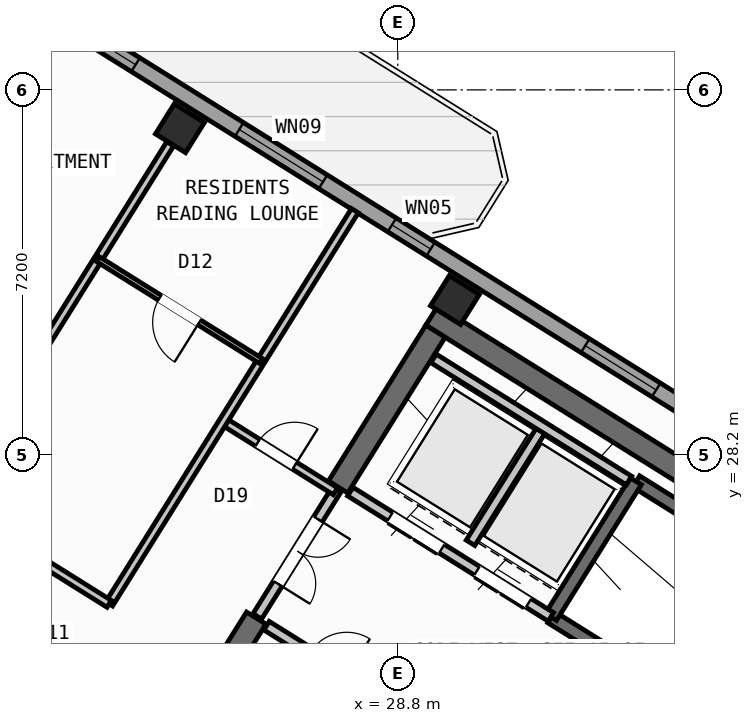
"""IFC4 building model, lengths in metres.
Left out: names, types, materials, properties, quantities, classifications, styles, units other than length and angle.
Written with IfcOpenShell. Run it as: python <this file> out.ifc"""

import sys

from ifc_helpers import new_model, si_unit, direction, frame, frame_2d, origin, origin_2d, place, context, subcontext, project, spatial, rectangle, hollow_rectangle, extrude, source, transform, mapped, element, fill, save


model = new_model("IFC4")
c1 = context("Model", 3, precision=1e-05, world=origin(), true_north=direction((0.0, 1.0)))
c2 = subcontext(c1, "Body", "Model", "MODEL_VIEW")
j1 = project(units=[si_unit("LENGTHUNIT", "METRE"), si_unit("PLANEANGLEUNIT", "RADIAN")], contexts=[c1])
p1 = place(None, origin())
s1 = spatial("IfcSite", under=j1, at=p1, CompositionType="ELEMENT")
p2 = place(p1, origin())
s2 = spatial("IfcBuilding", under=s1, at=p2, CompositionType="ELEMENT")
p3 = place(p2, frame((0.0, 0.0, 251.1)))
s3 = spatial("IfcBuildingStorey", under=s2, at=p3, CompositionType="ELEMENT", Elevation=251.1)
p4 = place(p3, frame((40.531, 24.036, 0.0), z_axis=(0.0, 0.0, 1.0), x_axis=(-0.848048787466, 0.529918157905, 0.0)))
e1 = element("IfcWall", 1, at=p4, inside=s3, PredefinedType="SHEAR", context=c2, shape_type="SweptSolid", body=[
    extrude(rectangle(XDim=13.04, YDim=0.45, at=frame_2d((6.52, 0.0))), origin(), (0.0, 0.0, 1.0), 3.32),
])
p5 = place(p3, frame((29.544, 30.636, 0.0), z_axis=(0.0, 0.0, 1.0), x_axis=(-0.529902075036, -0.848058836916, 0.0)))
e2 = element("IfcWall", 2, at=p5, inside=s3, PredefinedType="SHEAR", context=c2, shape_type="SweptSolid", body=[
    extrude(rectangle(XDim=3.625, YDim=0.45, at=frame_2d((1.812, 0.0))), origin(), (0.0, 0.0, 1.0), 3.32),
])
p6 = place(p3, frame((26.007, 24.976, 0.0), z_axis=(0.0, 0.0, 1.0), x_axis=(-0.529931155655, -0.848040665456, 0.0)))
e3 = element("IfcWall", 3, at=p6, inside=s3, PredefinedType="SHEAR", context=c2, shape_type="SweptSolid", body=[
    extrude(rectangle(XDim=6.475, YDim=0.45, at=frame_2d((3.238, 0.0))), origin(), (0.0, 0.0, 1.0), 3.32),
])
m1 = source(origin(), c2, "Body", "SweptSolid", [
    extrude(hollow_rectangle(XDim=0.7, YDim=0.7, WallThickness=0.028, at=origin_2d()), origin(), (0.0, 0.0, 1.0), 3.6),
])
for number, where, z_axis, x_axis in (
    (4, (29.928, 31.251, 0.0), (0.0, 0.0, 1.0), (-0.848, 0.53, 0.0)),
    (5, (24.5, 34.643, 0.0), (0.0, 0.0, 1.0), (-0.848, 0.53, 0.0)),
):
    element("IfcColumn", number, at=place(p3, frame(where, z_axis=z_axis, x_axis=x_axis)), inside=s3, PredefinedType="COLUMN", context=c2, shape_type="MappedRepresentation", body=[
        mapped(m1, transform((0.0, 0.0, 0.0), scale=1.0)),
    ])
p7 = place(p3, frame((14.138, 41.825, 0.0), z_axis=(0.0, 0.0, 1.0), x_axis=(0.848046498049, -0.529921821731, 0.0)))
e6 = element("IfcWall", 6, at=p7, inside=s3, PredefinedType="STANDARD", context=c2, shape_type="SweptSolid", body=[
    extrude(rectangle(XDim=31.588, YDim=0.32, at=frame_2d((15.794, 0.0))), origin(), (0.0, 0.0, 1.0), 3.32),
])
p8 = place(p7, frame((3.46, 0.0, 0.0)))
e7 = element("IfcOpeningElement", 7, at=p8, cuts=e6, PredefinedType="OPENING", context=c2, shape_type="SweptSolid", body=[
    extrude(rectangle(XDim=1.05, YDim=2.15, at=frame_2d((0.525, 1.075))), frame((0.0, 0.17, 0.0), z_axis=(0.0, -1.0, 0.0), x_axis=(1.0, 0.0, 0.0)), (0.0, 0.0, 1.0), 0.34),
])
p9 = place(p7, frame((0.831, 0.0, 1.0)))
e8 = element("IfcOpeningElement", 8, at=p9, cuts=e6, PredefinedType="OPENING", context=c2, shape_type="SweptSolid", body=[
    extrude(rectangle(XDim=0.9, YDim=1.25, at=frame_2d((0.45, 0.625))), frame((0.0, 0.17, 0.0), z_axis=(0.0, -1.0, 0.0), x_axis=(1.0, 0.0, 0.0)), (0.0, 0.0, 1.0), 0.34),
])
p10 = place(p7, frame((9.837, 0.0, 0.9)))
e9 = element("IfcOpeningElement", 9, at=p10, cuts=e6, PredefinedType="OPENING", context=c2, shape_type="SweptSolid", body=[
    extrude(rectangle(XDim=1.35, YDim=1.45, at=frame_2d((0.675, 0.725))), frame((0.0, 0.17, 0.0), z_axis=(0.0, -1.0, 0.0), x_axis=(1.0, 0.0, 0.0)), (0.0, 0.0, 1.0), 0.34),
])
p11 = place(p7, frame((13.599, 0.0, 0.95)))
e10 = element("IfcOpeningElement", 10, at=p11, cuts=e6, PredefinedType="OPENING", context=c2, shape_type="SweptSolid", body=[
    extrude(rectangle(XDim=1.95, YDim=1.35, at=frame_2d((0.975, 0.675))), frame((0.0, 0.17, 0.0), z_axis=(0.0, -1.0, 0.0), x_axis=(1.0, 0.0, 0.0)), (0.0, 0.0, 1.0), 0.34),
])
p12 = place(p7, frame((17.154, 0.0, 1.0)))
e11 = element("IfcOpeningElement", 11, at=p12, cuts=e6, PredefinedType="OPENING", context=c2, shape_type="SweptSolid", body=[
    extrude(rectangle(XDim=0.9, YDim=1.25, at=frame_2d((0.45, 0.625))), frame((0.0, 0.17, 0.0), z_axis=(0.0, -1.0, 0.0), x_axis=(1.0, 0.0, 0.0)), (0.0, 0.0, 1.0), 0.34),
])
p13 = place(p7, frame((21.651, 0.0, 0.9)))
e12 = element("IfcOpeningElement", 12, at=p13, cuts=e6, PredefinedType="OPENING", context=c2, shape_type="SweptSolid", body=[
    extrude(rectangle(XDim=1.65, YDim=1.45, at=frame_2d((0.825, 0.725))), frame((0.0, 0.17, 0.0), z_axis=(0.0, -1.0, 0.0), x_axis=(1.0, 0.0, 0.0)), (0.0, 0.0, 1.0), 0.34),
])
p14 = place(p7, frame((27.215, 0.0, 0.9)))
e13 = element("IfcOpeningElement", 13, at=p14, cuts=e6, PredefinedType="OPENING", context=c2, shape_type="SweptSolid", body=[
    extrude(rectangle(XDim=1.65, YDim=1.45, at=frame_2d((0.825, 0.725))), frame((0.0, 0.17, 0.0), z_axis=(0.0, -1.0, 0.0), x_axis=(1.0, 0.0, 0.0)), (0.0, 0.0, 1.0), 0.34),
])
p15 = place(p3, frame((39.721, 23.788, 0.0), z_axis=(0.0, 0.0, 1.0), x_axis=(-0.848054434086, 0.529909121291, 0.0)))
e14 = element("IfcWall", 14, at=p15, inside=s3, PredefinedType="SHEAR", context=c2, shape_type="SweptSolid", body=[
    extrude(rectangle(XDim=7.33, YDim=0.26, at=frame_2d((3.665, 0.0))), origin(), (0.0, 0.0, 1.0), 3.32),
])
p16 = place(p3, frame((38.046, 21.108, 0.0), z_axis=(0.0, 0.0, 1.0), x_axis=(-0.848054434086, 0.529909121291, 0.0)))
e15 = element("IfcWall", 15, at=p16, inside=s3, PredefinedType="SHEAR", context=c2, shape_type="SweptSolid", body=[
    extrude(rectangle(XDim=7.33, YDim=0.26, at=frame_2d((3.665, 0.0))), origin(), (0.0, 0.0, 1.0), 3.32),
])
p17 = place(p16, frame((0.22, 0.0, 0.0)))
e16 = element("IfcOpeningElement", 16, at=p17, cuts=e15, PredefinedType="OPENING", context=c2, shape_type="SweptSolid", body=[
    extrude(rectangle(XDim=1.1, YDim=2.1, at=frame_2d((0.55, 1.05))), frame((0.0, 0.14, 0.0), z_axis=(0.0, -1.0, 0.0), x_axis=(1.0, 0.0, 0.0)), (0.0, 0.0, 1.0), 0.28),
])
p18 = place(p3, frame((33.496, 27.677, 0.0), z_axis=(0.0, 0.0, 1.0), x_axis=(-0.529908658664, -0.84805472316, 0.0)))
e17 = element("IfcWall", 17, at=p18, inside=s3, PredefinedType="SHEAR", context=c2, shape_type="SweptSolid", body=[
    extrude(rectangle(XDim=3.16, YDim=0.26, at=frame_2d((1.58, 0.0))), origin(), (0.0, 0.0, 1.0), 3.32),
])
p19 = place(p3, frame((31.822, 24.998, 0.0), z_axis=(0.0, 0.0, 1.0), x_axis=(-0.848054125777, 0.529909614701, 0.0)))
e18 = element("IfcWall", 18, at=p19, inside=s3, PredefinedType="STANDARD", context=c2, shape_type="SweptSolid", body=[
    extrude(rectangle(XDim=4.668, YDim=0.2, at=frame_2d((2.334, 0.0))), origin(), (0.0, 0.0, 1.0), 3.31),
])
p20 = place(p19, frame((0.52, 0.0, 0.0)))
e19 = element("IfcOpeningElement", 19, at=p20, cuts=e18, PredefinedType="OPENING", context=c2, shape_type="SweptSolid", body=[
    extrude(rectangle(XDim=1.2, YDim=2.15, at=frame_2d((0.6, 1.075))), frame((0.0, 0.11, 0.0), z_axis=(0.0, -1.0, 0.0), x_axis=(1.0, 0.0, 0.0)), (0.0, 0.0, 1.0), 0.22),
])
p21 = place(p19, frame((2.54, 0.0, 0.0)))
e20 = element("IfcOpeningElement", 20, at=p21, cuts=e18, PredefinedType="OPENING", context=c2, shape_type="SweptSolid", body=[
    extrude(rectangle(XDim=1.2, YDim=2.15, at=frame_2d((0.6, 1.075))), frame((0.0, 0.11, 0.0), z_axis=(0.0, -1.0, 0.0), x_axis=(1.0, 0.0, 0.0)), (0.0, 0.0, 1.0), 0.22),
])
p22 = place(p3, frame((31.645, 28.716, 0.0), z_axis=(0.0, 0.0, 1.0), x_axis=(-0.52986693015, -0.848080795876, 0.0)))
e21 = element("IfcWall", 21, at=p22, inside=s3, PredefinedType="STANDARD", context=c2, shape_type="SweptSolid", body=[
    extrude(rectangle(XDim=2.66, YDim=0.2, at=frame_2d((1.33, 0.0))), origin(), (0.0, 0.0, 1.0), 3.31),
])
p23 = place(p3, frame((33.363, 27.69, 0.0), z_axis=(0.0, 0.0, 1.0), x_axis=(-0.84804957148, 0.529916903215, 0.0)))
e22 = element("IfcWall", 22, at=p23, inside=s3, PredefinedType="STANDARD", context=c2, shape_type="SweptSolid", body=[
    extrude(rectangle(XDim=4.548, YDim=0.2, at=frame_2d((2.274, 0.0))), origin(), (0.0, 0.0, 1.0), 3.31),
])
p24 = place(p3, frame((31.525, 21.504, 0.0), z_axis=(0.0, 0.0, 1.0), x_axis=(-0.848042066329, 0.529928913853, 0.0)))
e23 = element("IfcWall", 23, at=p24, inside=s3, PredefinedType="STANDARD", context=c2, shape_type="SweptSolid", body=[
    extrude(rectangle(XDim=6.268, YDim=0.2, at=frame_2d((3.134, 0.0))), origin(), (0.0, 0.0, 1.0), 3.31),
])
p25 = place(p24, frame((4.4, 0.0, 0.0)))
e24 = element("IfcOpeningElement", 24, at=p25, cuts=e23, PredefinedType="OPENING", context=c2, shape_type="SweptSolid", body=[
    extrude(rectangle(XDim=0.86, YDim=2.05, at=frame_2d((0.43, 1.025))), frame((0.0, 0.11, 0.0), z_axis=(0.0, -1.0, 0.0), x_axis=(1.0, 0.0, 0.0)), (0.0, 0.0, 1.0), 0.22),
])
p26 = place(p24, frame((1.45, 0.0, 0.0)))
e25 = element("IfcOpeningElement", 25, at=p26, cuts=e23, PredefinedType="OPENING", context=c2, shape_type="SweptSolid", body=[
    extrude(rectangle(XDim=0.86, YDim=2.05, at=frame_2d((0.43, 1.025))), frame((0.0, 0.11, 0.0), z_axis=(0.0, -1.0, 0.0), x_axis=(1.0, 0.0, 0.0)), (0.0, 0.0, 1.0), 0.22),
])
p27 = place(p3, frame((27.596, 27.52, 0.0), z_axis=(0.0, 0.0, 1.0), x_axis=(-0.529865479138, -0.848081702443, 0.0)))
e26 = element("IfcWall", 26, at=p27, inside=s3, PredefinedType="STANDARD", context=c2, shape_type="SweptSolid", body=[
    extrude(rectangle(XDim=2.96, YDim=0.2, at=frame_2d((1.48, 0.0))), origin(), (0.0, 0.0, 1.0), 3.31),
])
p28 = place(p27, frame((0.7, 0.0, 0.0)))
e27 = element("IfcOpeningElement", 27, at=p28, cuts=e26, PredefinedType="OPENING", context=c2, shape_type="SweptSolid", body=[
    extrude(rectangle(XDim=1.5, YDim=2.15, at=frame_2d((0.75, 1.075))), frame((0.0, 0.11, 0.0), z_axis=(0.0, -1.0, 0.0), x_axis=(1.0, 0.0, 0.0)), (0.0, 0.0, 1.0), 0.22),
])
p29 = place(p3, frame((27.57, 27.478, 0.0), z_axis=(0.0, 0.0, 1.0), x_axis=(-0.848050851465, 0.529914854792, 0.0)))
e28 = element("IfcWall", 28, at=p29, inside=s3, PredefinedType="PARTITIONING", context=c2, shape_type="SweptSolid", body=[
    extrude(rectangle(XDim=2.61, YDim=0.16, at=frame_2d((1.305, 0.0))), origin(), (0.0, 0.0, 1.0), 3.31),
])
p30 = place(p29, frame((0.95, 0.0, 0.0)))
e29 = element("IfcOpeningElement", 29, at=p30, cuts=e28, PredefinedType="OPENING", context=c2, shape_type="SweptSolid", body=[
    extrude(rectangle(XDim=0.86, YDim=2.05, at=frame_2d((0.43, 1.025))), frame((0.0, 0.09, 0.0), z_axis=(0.0, -1.0, 0.0), x_axis=(1.0, 0.0, 0.0)), (0.0, 0.0, 1.0), 0.18),
])
p31 = place(p3, frame((27.953, 33.016, 0.0), z_axis=(0.0, 0.0, 1.0), x_axis=(-0.529903001606, -0.848058257957, 0.0)))
e30 = element("IfcWall", 30, at=p31, inside=s3, PredefinedType="PARTITIONING", context=c2, shape_type="SweptSolid", body=[
    extrude(rectangle(XDim=9.15, YDim=0.16, at=frame_2d((4.575, 0.0))), origin(), (0.0, 0.0, 1.0), 3.31),
])
p32 = place(p3, frame((23.104, 25.256, 0.0), z_axis=(0.0, 0.0, 1.0), x_axis=(-0.848041752158, 0.529929416617, 0.0)))
e31 = element("IfcWall", 31, at=p32, inside=s3, PredefinedType="PARTITIONING", context=c2, shape_type="SweptSolid", body=[
    extrude(rectangle(XDim=16.73, YDim=0.16, at=frame_2d((8.365, 0.0))), origin(), (0.0, 0.0, 1.0), 3.31),
])
p33 = place(p32, frame((1.395, 0.0, 0.0)))
e32 = element("IfcOpeningElement", 32, at=p33, cuts=e31, PredefinedType="OPENING", context=c2, shape_type="SweptSolid", body=[
    extrude(rectangle(XDim=1.0, YDim=2.1, at=frame_2d((0.5, 1.05))), frame((0.0, 0.09, 0.0), z_axis=(0.0, -1.0, 0.0), x_axis=(1.0, 0.0, 0.0)), (0.0, 0.0, 1.0), 0.18),
])
p34 = place(p32, frame((7.82, 0.0, 0.0)))
e33 = element("IfcOpeningElement", 33, at=p34, cuts=e31, PredefinedType="OPENING", context=c2, shape_type="SweptSolid", body=[
    extrude(rectangle(XDim=1.0, YDim=2.1, at=frame_2d((0.5, 1.05))), frame((0.0, 0.09, 0.0), z_axis=(0.0, -1.0, 0.0), x_axis=(1.0, 0.0, 0.0)), (0.0, 0.0, 1.0), 0.18),
])
p35 = place(p32, frame((14.76, 0.0, 0.0)))
e34 = element("IfcOpeningElement", 34, at=p35, cuts=e31, PredefinedType="OPENING", context=c2, shape_type="SweptSolid", body=[
    extrude(rectangle(XDim=1.0, YDim=2.1, at=frame_2d((0.5, 1.05))), frame((0.0, 0.09, 0.0), z_axis=(0.0, -1.0, 0.0), x_axis=(1.0, 0.0, 0.0)), (0.0, 0.0, 1.0), 0.18),
])
p36 = place(p3, frame((24.309, 34.336, 0.0), z_axis=(0.0, 0.0, 1.0), x_axis=(-0.529895484599, -0.848062954858, 0.0)))
e35 = element("IfcWall", 35, at=p36, inside=s3, PredefinedType="PARTITIONING", context=c2, shape_type="SweptSolid", body=[
    extrude(rectangle(XDim=6.576, YDim=0.16, at=frame_2d((3.288, 0.0))), origin(), (0.0, 0.0, 1.0), 2.845),
])
p37 = place(p3, frame((26.099, 30.05, 0.0), z_axis=(0.0, 0.0, 1.0), x_axis=(-0.84803087207, 0.529946827537, 0.0)))
e36 = element("IfcWall", 36, at=p37, inside=s3, PredefinedType="PARTITIONING", context=c2, shape_type="SweptSolid", body=[
    extrude(rectangle(XDim=3.79, YDim=0.11, at=frame_2d((1.895, 0.0))), origin(), (0.0, 0.0, 1.0), 3.31),
])
p38 = place(p37, frame((1.435, 0.0, 0.0)))
e37 = element("IfcOpeningElement", 37, at=p38, cuts=e36, PredefinedType="OPENING", context=c2, shape_type="SweptSolid", body=[
    extrude(rectangle(XDim=0.92, YDim=2.08, at=frame_2d((0.46, 1.04))), frame((0.0, 0.065, 0.0), z_axis=(0.0, -1.0, 0.0), x_axis=(1.0, 0.0, 0.0)), (0.0, 0.0, 1.0), 0.13),
])
m2 = source(origin(), c2, "Body", "SweptSolid", [
    extrude(rectangle(XDim=1.35, YDim=1.45, at=frame_2d((0.675, 0.725))), frame((0.0, 0.03, 0.0), z_axis=(0.0, -1.0, 0.0), x_axis=(1.0, 0.0, 0.0)), (0.0, 0.0, 1.0), 0.06),
])
p39 = place(p10, origin())
e38 = element("IfcWindow", 38, at=p39, inside=s3, PartitioningType="SINGLE_PANEL", PredefinedType="WINDOW", context=c2, shape_type="MappedRepresentation", body=[
    mapped(m2, transform((0.0, 0.0, 0.0), scale=1.0)),
])
fill(e9, e38)
m3 = source(origin(), c2, "Body", "SweptSolid", [
    extrude(rectangle(XDim=1.95, YDim=1.35, at=frame_2d((0.975, 0.675))), frame((0.0, 0.03, 0.0), z_axis=(0.0, -1.0, 0.0), x_axis=(1.0, 0.0, 0.0)), (0.0, 0.0, 1.0), 0.06),
])
p40 = place(p11, origin())
e39 = element("IfcWindow", 39, at=p40, inside=s3, PartitioningType="SINGLE_PANEL", PredefinedType="WINDOW", context=c2, shape_type="MappedRepresentation", body=[
    mapped(m3, transform((0.0, 0.0, 0.0), scale=1.0)),
])
fill(e10, e39)
m4 = source(origin(), c2, "Body", "SweptSolid", [
    extrude(rectangle(XDim=0.9, YDim=1.25, at=frame_2d((0.45, 0.625))), frame((0.0, 0.03, 0.0), z_axis=(0.0, -1.0, 0.0), x_axis=(1.0, 0.0, 0.0)), (0.0, 0.0, 1.0), 0.06),
])
p41 = place(p12, origin())
e40 = element("IfcWindow", 40, at=p41, inside=s3, PartitioningType="SINGLE_PANEL", PredefinedType="WINDOW", context=c2, shape_type="MappedRepresentation", body=[
    mapped(m4, transform((0.0, 0.0, 0.0), scale=1.0)),
])
fill(e11, e40)
m5 = source(origin(), c2, "Body", "SweptSolid", [
    extrude(rectangle(XDim=1.65, YDim=1.45, at=frame_2d((0.825, 0.725))), frame((0.0, 0.03, 0.0), z_axis=(0.0, -1.0, 0.0), x_axis=(1.0, 0.0, 0.0)), (0.0, 0.0, 1.0), 0.06),
])
p42 = place(p13, origin())
e41 = element("IfcWindow", 41, at=p42, inside=s3, PartitioningType="SINGLE_PANEL", PredefinedType="WINDOW", context=c2, shape_type="MappedRepresentation", body=[
    mapped(m5, transform((0.0, 0.0, 0.0), scale=1.0)),
])
fill(e12, e41)
m6 = source(origin(), c2, "Body", "SweptSolid", [
    extrude(rectangle(XDim=1.2, YDim=2.15, at=frame_2d((0.6, 1.075))), frame((0.0, 0.025, 0.0), z_axis=(0.0, -1.0, 0.0), x_axis=(1.0, 0.0, 0.0)), (0.0, 0.0, 1.0), 0.05),
])
p43 = place(p20, origin())
e42 = element("IfcDoor", 42, at=p43, inside=s3, OperationType="DOUBLE_DOOR_SLIDING", PredefinedType="DOOR", context=c2, shape_type="MappedRepresentation", body=[
    mapped(m6, transform((0.0, 0.0, 0.0), scale=1.0)),
])
fill(e19, e42)
p44 = place(p21, origin())
e43 = element("IfcDoor", 43, at=p44, inside=s3, OperationType="DOUBLE_DOOR_SLIDING", PredefinedType="DOOR", context=c2, shape_type="MappedRepresentation", body=[
    mapped(m6, transform((0.0, 0.0, 0.0), scale=1.0)),
])
fill(e20, e43)
m7 = source(origin(), c2, "Body", "SweptSolid", [
    extrude(rectangle(XDim=0.86, YDim=2.05, at=frame_2d((0.43, 1.025))), frame((0.0, 0.025, 0.0), z_axis=(0.0, -1.0, 0.0), x_axis=(1.0, 0.0, 0.0)), (0.0, 0.0, 1.0), 0.05),
])
p45 = place(p30, frame((0.86, 0.0, 0.0), z_axis=(0.0, 0.0, 1.0), x_axis=(-1.0, 0.0, 0.0)))
e44 = element("IfcDoor", 44, at=p45, inside=s3, OperationType="SINGLE_SWING_RIGHT", PredefinedType="DOOR", context=c2, shape_type="MappedRepresentation", body=[
    mapped(m7, transform((0.0, 0.0, 0.0), scale=1.0)),
])
fill(e29, e44)
m8 = source(origin(), c2, "Body", "SweptSolid", [
    extrude(rectangle(XDim=1.5, YDim=2.15, at=frame_2d((0.75, 1.075))), frame((0.0, 0.025, 0.0), z_axis=(0.0, -1.0, 0.0), x_axis=(1.0, 0.0, 0.0)), (0.0, 0.0, 1.0), 0.05),
])
p46 = place(p28, origin())
e45 = element("IfcDoor", 45, at=p46, inside=s3, OperationType="DOUBLE_DOOR_SINGLE_SWING", PredefinedType="DOOR", context=c2, shape_type="MappedRepresentation", body=[
    mapped(m8, transform((0.0, 0.0, 0.0), scale=1.0)),
])
fill(e27, e45)
m9 = source(origin(), c2, "Body", "SweptSolid", [
    extrude(rectangle(XDim=0.92, YDim=2.08, at=frame_2d((0.46, 1.04))), frame((0.0, 0.025, 0.0), z_axis=(0.0, -1.0, 0.0), x_axis=(1.0, 0.0, 0.0)), (0.0, 0.0, 1.0), 0.05),
])
p47 = place(p38, origin())
e46 = element("IfcDoor", 46, at=p47, inside=s3, OperationType="SINGLE_SWING_LEFT", PredefinedType="DOOR", context=c2, shape_type="MappedRepresentation", body=[
    mapped(m9, transform((0.0, 0.0, 0.0), scale=1.0)),
])
fill(e37, e46)
save(model, sys.argv[1])
